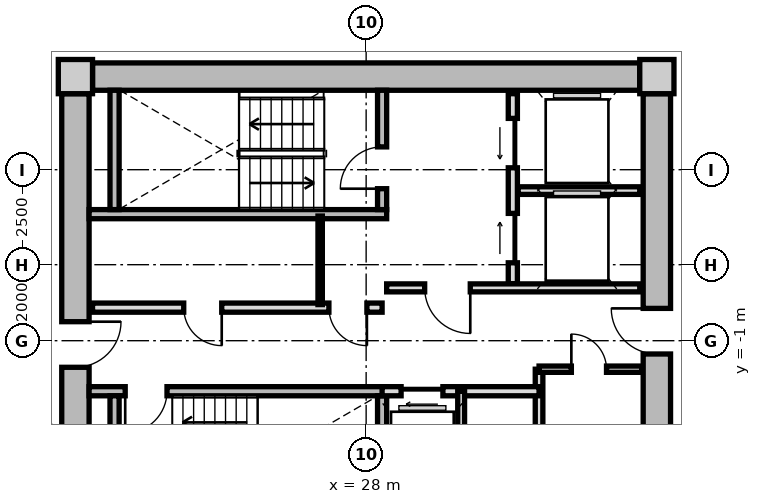
"""IFC4 building model, lengths in metres.
Left out: names, types, materials, properties, quantities, classifications, styles, units other than length and angle.
Written with IfcOpenShell. Run it as: python <this file> out.ifc"""

import sys

from ifc_helpers import new_model, si_unit, direction, frame, frame_2d, origin, origin_2d, place, context, subcontext, project, spatial, rectangle, extrude, source, transform, mapped, element, fill, save


model = new_model("IFC4")
c1 = context("Model", 3, precision=1e-05, world=origin(), true_north=direction((0.0, 1.0)))
c2 = subcontext(c1, "Body", "Model", "MODEL_VIEW")
j1 = project(units=[si_unit("LENGTHUNIT", "METRE"), si_unit("PLANEANGLEUNIT", "RADIAN")], contexts=[c1])
p1 = place(None, origin())
s1 = spatial("IfcSite", under=j1, at=p1, CompositionType="ELEMENT")
p2 = place(p1, origin())
s2 = spatial("IfcBuilding", under=s1, at=p2, CompositionType="ELEMENT")
p3 = place(p2, frame((0.0, 0.0, 111.5)))
s3 = spatial("IfcBuildingStorey", under=s2, at=p3, CompositionType="ELEMENT", Elevation=111.5)
m1 = source(origin(), c2, "Body", "SweptSolid", [
    extrude(rectangle(XDim=0.9, YDim=0.9, at=origin_2d()), origin(), (0.0, 0.0, 1.0), 3.05),
])
for number, where, z_axis, x_axis in (
    (1, (35.65, 5.95, 0.0), (0.0, 0.0, 1.0), (1.0, 0.0, 0.0)),
    (2, (20.35, 5.95, 0.0), (0.0, 0.0, 1.0), (1.0, 0.0, 0.0)),
):
    element("IfcColumn", number, at=place(p3, frame(where, z_axis=z_axis, x_axis=x_axis)), inside=s3, PredefinedType="COLUMN", context=c2, shape_type="MappedRepresentation", body=[
        mapped(m1, transform((0.0, 0.0, 0.0), x_axis=(1.0, 0.0, 0.0), y_axis=(0.0, 1.0, 0.0), z_axis=(0.0, 0.0, 1.0), scale=1.0)),
    ])
m2 = source(origin(), c2, "Body", "SweptSolid", [
    extrude(rectangle(XDim=14.4, YDim=0.72, at=frame_2d((7.2, 0.0))), origin(), (0.0, 0.0, 1.0), 2.79),
])
p4 = place(p3, frame((20.8, 5.95, 0.0), z_axis=(0.0, 0.0, 1.0), x_axis=(1.0, 0.0, 0.0)))
e3 = element("IfcWall", 3, at=p4, inside=s3, PredefinedType="SHEAR", context=c2, shape_type="MappedRepresentation", body=[
    mapped(m2, transform((0.0, 0.0, 0.0), x_axis=(1.0, 0.0, 0.0), y_axis=(0.0, 1.0, 0.0), z_axis=(0.0, 0.0, 1.0), scale=1.0)),
])
m3 = source(origin(), c2, "Body", "SweptSolid", [
    extrude(rectangle(XDim=11.0, YDim=0.72, at=frame_2d((5.5, 0.0))), origin(), (0.0, 0.0, 1.0), 2.79),
])
p5 = place(p3, frame((20.35, -5.5, 0.0), z_axis=(0.0, 0.0, 1.0), x_axis=(0.0, 1.0, 0.0)))
e4 = element("IfcWall", 4, at=p5, inside=s3, PredefinedType="SHEAR", context=c2, shape_type="MappedRepresentation", body=[
    mapped(m3, transform((0.0, 0.0, 0.0), x_axis=(1.0, 0.0, 0.0), y_axis=(0.0, 1.0, 0.0), z_axis=(0.0, 0.0, 1.0), scale=1.0)),
])
p6 = place(p5, frame((3.8, 0.0, 0.0)))
e5 = element("IfcOpeningElement", 5, at=p6, cuts=e4, PredefinedType="OPENING", context=c2, shape_type="SweptSolid", body=[
    extrude(rectangle(XDim=1.2, YDim=2.15, at=frame_2d((0.6, 1.075))), frame((0.0, 0.37, 0.0), z_axis=(0.0, -1.0, 0.0), x_axis=(1.0, 0.0, 0.0)), (0.0, 0.0, 1.0), 0.74),
])
p7 = place(p3, frame((35.65, 5.5, 0.0), z_axis=(0.0, 0.0, 1.0), x_axis=(0.0, -1.0, 0.0)))
e6 = element("IfcWall", 6, at=p7, inside=s3, PredefinedType="SHEAR", context=c2, shape_type="MappedRepresentation", body=[
    mapped(m3, transform((0.0, 0.0, 0.0), x_axis=(1.0, 0.0, 0.0), y_axis=(0.0, 1.0, 0.0), z_axis=(0.0, 0.0, 1.0), scale=1.0)),
])
p8 = place(p7, frame((5.65, 0.0, 0.0)))
e7 = element("IfcOpeningElement", 7, at=p8, cuts=e6, PredefinedType="OPENING", context=c2, shape_type="SweptSolid", body=[
    extrude(rectangle(XDim=1.2, YDim=2.15, at=frame_2d((0.6, 1.075))), frame((0.0, 0.37, 0.0), z_axis=(0.0, -1.0, 0.0), x_axis=(1.0, 0.0, 0.0)), (0.0, 0.0, 1.0), 0.74),
])
p9 = place(p7, frame((9.3, 0.0, 0.0)))
e8 = element("IfcOpeningElement", 8, at=p9, cuts=e6, PredefinedType="OPENING", context=c2, shape_type="SweptSolid", body=[
    extrude(rectangle(XDim=1.0, YDim=2.1, at=frame_2d((0.5, 1.05))), frame((0.0, 0.37, 0.0), z_axis=(0.0, -1.0, 0.0), x_axis=(1.0, 0.0, 0.0)), (0.0, 0.0, 1.0), 0.74),
])
m4 = source(origin(), c2, "Body", "SweptSolid", [
    extrude(rectangle(XDim=7.83, YDim=0.24, at=frame_2d((3.915, 0.0))), origin(), (0.0, 0.0, 1.0), 2.79),
])
p10 = place(p3, frame((20.71, 2.33, 0.0), z_axis=(0.0, 0.0, 1.0), x_axis=(1.0, 0.0, 0.0)))
e9 = element("IfcWall", 9, at=p10, inside=s3, PredefinedType="PARTITIONING", context=c2, shape_type="MappedRepresentation", body=[
    mapped(m4, transform((0.0, 0.0, 0.0), x_axis=(1.0, 0.0, 0.0), y_axis=(0.0, 1.0, 0.0), z_axis=(0.0, 0.0, 1.0), scale=1.0)),
])
m5 = source(origin(), c2, "Body", "SweptSolid", [
    extrude(rectangle(XDim=3.14, YDim=0.24, at=frame_2d((1.57, 0.0))), origin(), (0.0, 0.0, 1.0), 2.79),
])
p11 = place(p3, frame((21.38, 2.45, 0.0), z_axis=(0.0, 0.0, 1.0), x_axis=(0.0, 1.0, 0.0)))
e10 = element("IfcWall", 10, at=p11, inside=s3, PredefinedType="PARTITIONING", context=c2, shape_type="MappedRepresentation", body=[
    mapped(m5, transform((0.0, 0.0, 0.0), x_axis=(1.0, 0.0, 0.0), y_axis=(0.0, 1.0, 0.0), z_axis=(0.0, 0.0, 1.0), scale=1.0)),
])
p12 = place(p3, frame((28.42, 2.45, 0.0), z_axis=(0.0, 0.0, 1.0), x_axis=(0.0, 1.0, 0.0)))
e11 = element("IfcWall", 11, at=p12, inside=s3, PredefinedType="PARTITIONING", context=c2, shape_type="MappedRepresentation", body=[
    mapped(m5, transform((0.0, 0.0, 0.0), x_axis=(1.0, 0.0, 0.0), y_axis=(0.0, 1.0, 0.0), z_axis=(0.0, 0.0, 1.0), scale=1.0)),
])
p13 = place(p12, frame((0.55, 0.0, 0.0)))
e12 = element("IfcOpeningElement", 12, at=p13, cuts=e11, PredefinedType="OPENING", context=c2, shape_type="SweptSolid", body=[
    extrude(rectangle(XDim=1.1, YDim=2.15, at=frame_2d((0.55, 1.075))), frame((0.0, 0.13, 0.0), z_axis=(0.0, -1.0, 0.0), x_axis=(1.0, 0.0, 0.0)), (0.0, 0.0, 1.0), 0.26),
])
p14 = place(p3, frame((20.71, -2.33, 0.0), z_axis=(0.0, 0.0, 1.0), x_axis=(1.0, 0.0, 0.0)))
e13 = element("IfcWall", 13, at=p14, inside=s3, PredefinedType="PARTITIONING", context=c2, shape_type="MappedRepresentation", body=[
    mapped(m4, transform((0.0, 0.0, 0.0), x_axis=(1.0, 0.0, 0.0), y_axis=(0.0, 1.0, 0.0), z_axis=(0.0, 0.0, 1.0), scale=1.0)),
])
p15 = place(p14, frame((0.95, 0.0, 0.0)))
e14 = element("IfcOpeningElement", 14, at=p15, cuts=e13, PredefinedType="OPENING", context=c2, shape_type="SweptSolid", body=[
    extrude(rectangle(XDim=1.1, YDim=2.15, at=frame_2d((0.55, 1.075))), frame((0.0, 0.13, 0.0), z_axis=(0.0, -1.0, 0.0), x_axis=(1.0, 0.0, 0.0)), (0.0, 0.0, 1.0), 0.26),
])
for number, where, z_axis, x_axis in (
    (15, (21.38, -5.59, 0.0), (0.0, 0.0, 1.0), (0.0, 1.0, 0.0)),
    (16, (28.42, -5.59, 0.0), (0.0, 0.0, 1.0), (0.0, 1.0, 0.0)),
):
    element("IfcWall", number, at=place(p3, frame(where, z_axis=z_axis, x_axis=x_axis)), inside=s3, PredefinedType="PARTITIONING", context=c2, shape_type="MappedRepresentation", body=[
        mapped(m5, transform((0.0, 0.0, 0.0), x_axis=(1.0, 0.0, 0.0), y_axis=(0.0, 1.0, 0.0), z_axis=(0.0, 0.0, 1.0), scale=1.0)),
    ])
m6 = source(origin(), c2, "Body", "SweptSolid", [
    extrude(rectangle(XDim=5.0, YDim=0.24, at=frame_2d((2.5, 0.0))), origin(), (0.0, 0.0, 1.0), 2.775),
])
p16 = place(p3, frame((31.86, 0.5, 0.0), z_axis=(0.0, 0.0, 1.0), x_axis=(0.0, 1.0, 0.0)))
e17 = element("IfcWall", 17, at=p16, inside=s3, PredefinedType="PARTITIONING", context=c2, shape_type="MappedRepresentation", body=[
    mapped(m6, transform((0.0, 0.0, 0.0), x_axis=(1.0, 0.0, 0.0), y_axis=(0.0, 1.0, 0.0), z_axis=(0.0, 0.0, 1.0), scale=1.0)),
])
p17 = place(p16, frame((3.05, 0.0, 0.0)))
e18 = element("IfcOpeningElement", 18, at=p17, cuts=e17, PredefinedType="OPENING", context=c2, shape_type="SweptSolid", body=[
    extrude(rectangle(XDim=1.3, YDim=2.2, at=frame_2d((0.65, 1.1))), frame((0.0, 0.13, 0.0), z_axis=(0.0, -1.0, 0.0), x_axis=(1.0, 0.0, 0.0)), (0.0, 0.0, 1.0), 0.26),
])
p18 = place(p16, frame((0.55, 0.0, 0.0)))
e19 = element("IfcOpeningElement", 19, at=p18, cuts=e17, PredefinedType="OPENING", context=c2, shape_type="SweptSolid", body=[
    extrude(rectangle(XDim=1.3, YDim=2.2, at=frame_2d((0.65, 1.1))), frame((0.0, 0.13, 0.0), z_axis=(0.0, -1.0, 0.0), x_axis=(1.0, 0.0, 0.0)), (0.0, 0.0, 1.0), 0.26),
])
m7 = source(origin(), c2, "Body", "SweptSolid", [
    extrude(rectangle(XDim=3.2, YDim=0.2, at=frame_2d((1.6, 0.0))), origin(), (0.0, 0.0, 1.0), 2.775),
])
p19 = place(p3, frame((32.0, 2.95, 0.0), z_axis=(0.0, 0.0, 1.0), x_axis=(1.0, 0.0, 0.0)))
e20 = element("IfcWall", 20, at=p19, inside=s3, PredefinedType="PARTITIONING", context=c2, shape_type="MappedRepresentation", body=[
    mapped(m7, transform((0.0, 0.0, 0.0), x_axis=(1.0, 0.0, 0.0), y_axis=(0.0, 1.0, 0.0), z_axis=(0.0, 0.0, 1.0), scale=1.0)),
])
m8 = source(origin(), c2, "Body", "SweptSolid", [
    extrude(rectangle(XDim=6.66, YDim=0.21, at=frame_2d((3.33, 0.0))), origin(), (0.0, 0.0, 1.0), 2.775),
])
p20 = place(p3, frame((28.54, 0.39, 0.0), z_axis=(0.0, 0.0, 1.0), x_axis=(1.0, 0.0, 0.0)))
e21 = element("IfcWall", 21, at=p20, inside=s3, PredefinedType="PARTITIONING", context=c2, shape_type="MappedRepresentation", body=[
    mapped(m8, transform((0.0, 0.0, 0.0), x_axis=(1.0, 0.0, 0.0), y_axis=(0.0, 1.0, 0.0), z_axis=(0.0, 0.0, 1.0), scale=1.0)),
])
p21 = place(p20, frame((1.0, 0.0, 0.0)))
e22 = element("IfcOpeningElement", 22, at=p21, cuts=e21, PredefinedType="OPENING", context=c2, shape_type="SweptSolid", body=[
    extrude(rectangle(XDim=1.2, YDim=2.15, at=frame_2d((0.6, 1.075))), frame((0.0, 0.115, 0.0), z_axis=(0.0, -1.0, 0.0), x_axis=(1.0, 0.0, 0.0)), (0.0, 0.0, 1.0), 0.23),
])
m9 = source(origin(), c2, "Body", "SweptSolid", [
    extrude(rectangle(XDim=7.62, YDim=0.24, at=frame_2d((3.81, 0.0))), origin(), (0.0, 0.0, 1.0), 2.775),
])
p22 = place(p3, frame((20.8, -0.13, 0.0), z_axis=(0.0, 0.0, 1.0), x_axis=(1.0, 0.0, 0.0)))
e23 = element("IfcWall", 23, at=p22, inside=s3, PredefinedType="PARTITIONING", context=c2, shape_type="MappedRepresentation", body=[
    mapped(m9, transform((0.0, 0.0, 0.0), x_axis=(1.0, 0.0, 0.0), y_axis=(0.0, 1.0, 0.0), z_axis=(0.0, 0.0, 1.0), scale=1.0)),
])
p23 = place(p22, frame((6.22, 0.0, 0.0)))
e24 = element("IfcOpeningElement", 24, at=p23, cuts=e23, PredefinedType="OPENING", context=c2, shape_type="SweptSolid", body=[
    extrude(rectangle(XDim=1.0, YDim=2.1, at=frame_2d((0.5, 1.05))), frame((0.0, 0.13, 0.0), z_axis=(0.0, -1.0, 0.0), x_axis=(1.0, 0.0, 0.0)), (0.0, 0.0, 1.0), 0.26),
])
p24 = place(p22, frame((2.4, 0.0, 0.0)))
e25 = element("IfcOpeningElement", 25, at=p24, cuts=e23, PredefinedType="OPENING", context=c2, shape_type="SweptSolid", body=[
    extrude(rectangle(XDim=1.0, YDim=2.1, at=frame_2d((0.5, 1.05))), frame((0.0, 0.13, 0.0), z_axis=(0.0, -1.0, 0.0), x_axis=(1.0, 0.0, 0.0)), (0.0, 0.0, 1.0), 0.26),
])
m10 = source(origin(), c2, "Body", "SweptSolid", [
    extrude(rectangle(XDim=2.33, YDim=0.115, at=frame_2d((1.165, 0.0))), origin(), (0.0, 0.0, 1.0), 2.775),
])
p25 = place(p3, frame((26.79, -0.05, 0.0), z_axis=(0.0, 0.0, 1.0), x_axis=(0.0, 1.0, 0.0)))
e26 = element("IfcWall", 26, at=p25, inside=s3, PredefinedType="PARTITIONING", context=c2, shape_type="MappedRepresentation", body=[
    mapped(m10, transform((0.0, 0.0, 0.0), x_axis=(1.0, 0.0, 0.0), y_axis=(0.0, 1.0, 0.0), z_axis=(0.0, 0.0, 1.0), scale=1.0)),
])
m11 = source(origin(), c2, "Body", "SweptSolid", [
    extrude(rectangle(XDim=3.8, YDim=0.2, at=frame_2d((1.9, 0.0))), origin(), (0.0, 0.0, 1.0), 2.775),
])
p26 = place(p3, frame((32.55, -5.55, 0.0), z_axis=(0.0, 0.0, 1.0), x_axis=(0.0, 1.0, 0.0)))
e27 = element("IfcWall", 27, at=p26, inside=s3, PredefinedType="PARTITIONING", context=c2, shape_type="MappedRepresentation", body=[
    mapped(m11, transform((0.0, 0.0, 0.0), x_axis=(1.0, 0.0, 0.0), y_axis=(0.0, 1.0, 0.0), z_axis=(0.0, 0.0, 1.0), scale=1.0)),
])
m12 = source(origin(), c2, "Body", "SweptSolid", [
    extrude(rectangle(XDim=4.13, YDim=0.24, at=frame_2d((2.065, 0.0))), origin(), (0.0, 0.0, 1.0), 2.775),
])
p27 = place(p3, frame((28.42, -2.33, 0.0), z_axis=(0.0, 0.0, 1.0), x_axis=(1.0, 0.0, 0.0)))
e28 = element("IfcWall", 28, at=p27, inside=s3, PredefinedType="PARTITIONING", context=c2, shape_type="MappedRepresentation", body=[
    mapped(m12, transform((0.0, 0.0, 0.0), x_axis=(1.0, 0.0, 0.0), y_axis=(0.0, 1.0, 0.0), z_axis=(0.0, 0.0, 1.0), scale=1.0)),
])
p28 = place(p27, frame((0.5, 0.0, 0.0)))
e29 = element("IfcOpeningElement", 29, at=p28, cuts=e28, PredefinedType="OPENING", context=c2, shape_type="SweptSolid", body=[
    extrude(rectangle(XDim=1.1, YDim=2.2, at=frame_2d((0.55, 1.1))), frame((0.0, 0.13, 0.0), z_axis=(0.0, -1.0, 0.0), x_axis=(1.0, 0.0, 0.0)), (0.0, 0.0, 1.0), 0.26),
])
m13 = source(origin(), c2, "Body", "SweptSolid", [
    extrude(rectangle(XDim=3.22, YDim=0.18, at=frame_2d((1.61, 0.0))), origin(), (0.0, 0.0, 1.0), 2.775),
])
p29 = place(p3, frame((30.5, -5.55, 0.0), z_axis=(0.0, 0.0, 1.0), x_axis=(0.0, 1.0, 0.0)))
e30 = element("IfcWall", 30, at=p29, inside=s3, PredefinedType="PARTITIONING", context=c2, shape_type="MappedRepresentation", body=[
    mapped(m13, transform((0.0, 0.0, 0.0), x_axis=(1.0, 0.0, 0.0), y_axis=(0.0, 1.0, 0.0), z_axis=(0.0, 0.0, 1.0), scale=1.0)),
])
m14 = source(origin(), c2, "Body", "SweptSolid", [
    extrude(rectangle(XDim=2.7, YDim=0.165, at=frame_2d((1.35, 0.0))), origin(), (0.0, 0.0, 1.0), 2.775),
])
p30 = place(p3, frame((32.55, -1.75, 0.0), z_axis=(0.0, 0.0, 1.0), x_axis=(1.0, 0.0, 0.0)))
e31 = element("IfcWall", 31, at=p30, inside=s3, PredefinedType="PARTITIONING", context=c2, shape_type="MappedRepresentation", body=[
    mapped(m14, transform((0.0, 0.0, 0.0), x_axis=(1.0, 0.0, 0.0), y_axis=(0.0, 1.0, 0.0), z_axis=(0.0, 0.0, 1.0), scale=1.0)),
])
p31 = place(p30, frame((0.85, 0.0, 0.0)))
e32 = element("IfcOpeningElement", 32, at=p31, cuts=e31, PredefinedType="OPENING", context=c2, shape_type="SweptSolid", body=[
    extrude(rectangle(XDim=0.925, YDim=2.1, at=frame_2d((0.462, 1.05))), frame((0.0, 0.093, 0.0), z_axis=(0.0, -1.0, 0.0), x_axis=(1.0, 0.0, 0.0)), (0.0, 0.0, 1.0), 0.185),
])
m15 = source(origin(), c2, "Body", "SweptSolid", [
    extrude(rectangle(XDim=1.1, YDim=2.15, at=frame_2d((0.55, 1.075))), frame((0.0, 0.025, 0.0), z_axis=(0.0, -1.0, 0.0), x_axis=(1.0, 0.0, 0.0)), (0.0, 0.0, 1.0), 0.05),
])
p32 = place(p13, origin())
e33 = element("IfcDoor", 33, at=p32, inside=s3, OperationType="SINGLE_SWING_LEFT", PredefinedType="DOOR", context=c2, shape_type="MappedRepresentation", body=[
    mapped(m15, transform((0.0, 0.0, 0.0), x_axis=(1.0, 0.0, 0.0), y_axis=(0.0, 1.0, 0.0), z_axis=(0.0, 0.0, 1.0), scale=1.0)),
])
fill(e12, e33)
p33 = place(p15, frame((1.1, 0.0, 0.0), z_axis=(0.0, 0.0, 1.0), x_axis=(-1.0, 0.0, 0.0)))
e34 = element("IfcDoor", 34, at=p33, inside=s3, OperationType="SINGLE_SWING_RIGHT", PredefinedType="DOOR", context=c2, shape_type="MappedRepresentation", body=[
    mapped(m15, transform((0.0, 0.0, 0.0), x_axis=(1.0, 0.0, 0.0), y_axis=(0.0, 1.0, 0.0), z_axis=(0.0, 0.0, 1.0), scale=1.0)),
])
fill(e14, e34)
m16 = source(origin(), c2, "Body", "SweptSolid", [
    extrude(rectangle(XDim=1.3, YDim=2.2, at=frame_2d((0.65, 1.1))), frame((0.0, 0.025, 0.0), z_axis=(0.0, -1.0, 0.0), x_axis=(1.0, 0.0, 0.0)), (0.0, 0.0, 1.0), 0.05),
])
p34 = place(p17, origin())
e35 = element("IfcDoor", 35, at=p34, inside=s3, OperationType="SLIDING_TO_LEFT", PredefinedType="DOOR", context=c2, shape_type="MappedRepresentation", body=[
    mapped(m16, transform((0.0, 0.0, 0.0), x_axis=(1.0, 0.0, 0.0), y_axis=(0.0, 1.0, 0.0), z_axis=(0.0, 0.0, 1.0), scale=1.0)),
])
fill(e18, e35)
p35 = place(p18, origin())
e36 = element("IfcDoor", 36, at=p35, inside=s3, OperationType="SLIDING_TO_RIGHT", PredefinedType="DOOR", context=c2, shape_type="MappedRepresentation", body=[
    mapped(m16, transform((0.0, 0.0, 0.0), x_axis=(1.0, 0.0, 0.0), y_axis=(0.0, 1.0, 0.0), z_axis=(0.0, 0.0, 1.0), scale=1.0)),
])
fill(e19, e36)
m17 = source(origin(), c2, "Body", "SweptSolid", [
    extrude(rectangle(XDim=1.2, YDim=2.15, at=frame_2d((0.6, 1.075))), frame((0.0, 0.025, 0.0), z_axis=(0.0, -1.0, 0.0), x_axis=(1.0, 0.0, 0.0)), (0.0, 0.0, 1.0), 0.05),
])
p36 = place(p21, frame((1.2, 0.0, 0.0), z_axis=(0.0, 0.0, 1.0), x_axis=(-1.0, 0.0, 0.0)))
e37 = element("IfcDoor", 37, at=p36, inside=s3, OperationType="SINGLE_SWING_LEFT", PredefinedType="DOOR", context=c2, shape_type="MappedRepresentation", body=[
    mapped(m17, transform((0.0, 0.0, 0.0), x_axis=(1.0, 0.0, 0.0), y_axis=(0.0, 1.0, 0.0), z_axis=(0.0, 0.0, 1.0), scale=1.0)),
])
fill(e22, e37)
p37 = place(p6, frame((1.2, 0.0, 0.0), z_axis=(0.0, 0.0, 1.0), x_axis=(-1.0, 0.0, 0.0)))
e38 = element("IfcDoor", 38, at=p37, inside=s3, OperationType="SINGLE_SWING_LEFT", PredefinedType="DOOR", context=c2, shape_type="MappedRepresentation", body=[
    mapped(m17, transform((0.0, 0.0, 0.0), x_axis=(1.0, 0.0, 0.0), y_axis=(0.0, 1.0, 0.0), z_axis=(0.0, 0.0, 1.0), scale=1.0)),
])
fill(e5, e38)
p38 = place(p8, frame((1.2, 0.0, 0.0), z_axis=(0.0, 0.0, 1.0), x_axis=(-1.0, 0.0, 0.0)))
e39 = element("IfcDoor", 39, at=p38, inside=s3, OperationType="SINGLE_SWING_RIGHT", PredefinedType="DOOR", context=c2, shape_type="MappedRepresentation", body=[
    mapped(m17, transform((0.0, 0.0, 0.0), x_axis=(1.0, 0.0, 0.0), y_axis=(0.0, 1.0, 0.0), z_axis=(0.0, 0.0, 1.0), scale=1.0)),
])
fill(e7, e39)
m18 = source(origin(), c2, "Body", "SweptSolid", [
    extrude(rectangle(XDim=1.0, YDim=2.1, at=frame_2d((0.5, 1.05))), frame((0.0, 0.025, 0.0), z_axis=(0.0, -1.0, 0.0), x_axis=(1.0, 0.0, 0.0)), (0.0, 0.0, 1.0), 0.05),
])
p39 = place(p23, frame((1.0, 0.0, 0.0), z_axis=(0.0, 0.0, 1.0), x_axis=(-1.0, 0.0, 0.0)))
e40 = element("IfcDoor", 40, at=p39, inside=s3, OperationType="SINGLE_SWING_LEFT", PredefinedType="DOOR", context=c2, shape_type="MappedRepresentation", body=[
    mapped(m18, transform((0.0, 0.0, 0.0), x_axis=(1.0, 0.0, 0.0), y_axis=(0.0, 1.0, 0.0), z_axis=(0.0, 0.0, 1.0), scale=1.0)),
])
fill(e24, e40)
p40 = place(p24, frame((1.0, 0.0, 0.0), z_axis=(0.0, 0.0, 1.0), x_axis=(-1.0, 0.0, 0.0)))
e41 = element("IfcDoor", 41, at=p40, inside=s3, OperationType="SINGLE_SWING_LEFT", PredefinedType="DOOR", context=c2, shape_type="MappedRepresentation", body=[
    mapped(m18, transform((0.0, 0.0, 0.0), x_axis=(1.0, 0.0, 0.0), y_axis=(0.0, 1.0, 0.0), z_axis=(0.0, 0.0, 1.0), scale=1.0)),
])
fill(e25, e41)
m19 = source(origin(), c2, "Body", "SweptSolid", [
    extrude(rectangle(XDim=1.1, YDim=2.2, at=frame_2d((0.55, 1.1))), frame((0.0, 0.025, 0.0), z_axis=(0.0, -1.0, 0.0), x_axis=(1.0, 0.0, 0.0)), (0.0, 0.0, 1.0), 0.05),
])
p41 = place(p28, frame((1.1, 0.0, 0.0), z_axis=(0.0, 0.0, 1.0), x_axis=(-1.0, 0.0, 0.0)))
e42 = element("IfcDoor", 42, at=p41, inside=s3, OperationType="SLIDING_TO_LEFT", PredefinedType="DOOR", context=c2, shape_type="MappedRepresentation", body=[
    mapped(m19, transform((0.0, 0.0, 0.0), x_axis=(1.0, 0.0, 0.0), y_axis=(0.0, 1.0, 0.0), z_axis=(0.0, 0.0, 1.0), scale=1.0)),
])
fill(e29, e42)
m20 = source(origin(), c2, "Body", "SweptSolid", [
    extrude(rectangle(XDim=0.925, YDim=2.1, at=frame_2d((0.462, 1.05))), frame((0.0, 0.025, 0.0), z_axis=(0.0, -1.0, 0.0), x_axis=(1.0, 0.0, 0.0)), (0.0, 0.0, 1.0), 0.05),
])
p42 = place(p31, origin())
e43 = element("IfcDoor", 43, at=p42, inside=s3, OperationType="SINGLE_SWING_LEFT", PredefinedType="DOOR", context=c2, shape_type="MappedRepresentation", body=[
    mapped(m20, transform((0.0, 0.0, 0.0), x_axis=(1.0, 0.0, 0.0), y_axis=(0.0, 1.0, 0.0), z_axis=(0.0, 0.0, 1.0), scale=1.0)),
])
fill(e32, e43)
save(model, sys.argv[1])
